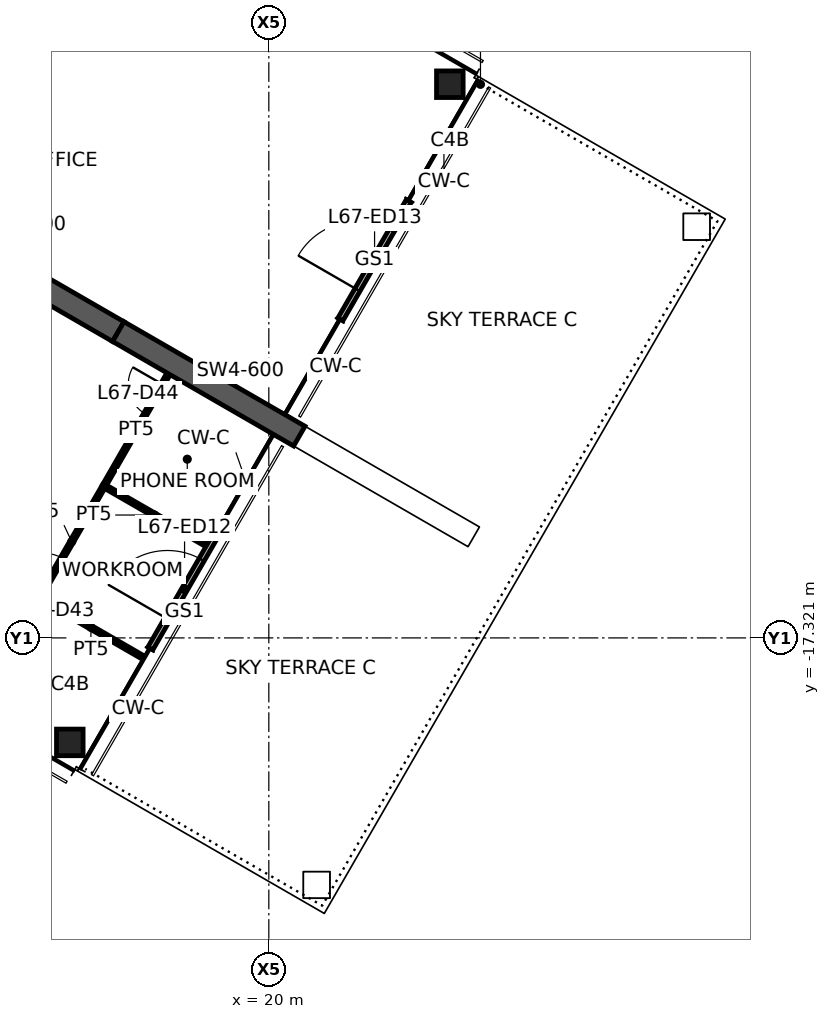
"""IFC4 building model, lengths in metres.
Left out: names, types, materials, properties, quantities, classifications, styles, units other than length and angle.
Written with IfcOpenShell. Run it as: python <this file> out.ifc"""

import sys

from ifc_helpers import new_model, si_unit, direction, frame, frame_2d, origin, origin_2d, place, context, subcontext, project, spatial, rectangle, hollow_rectangle, extrude, element, fill, save


model = new_model("IFC4")
c1 = context("Model", 3, precision=1e-05, world=origin(), true_north=direction((0.0, 1.0)))
c2 = subcontext(c1, "Body", "Model", "MODEL_VIEW")
j1 = project(units=[si_unit("LENGTHUNIT", "METRE"), si_unit("PLANEANGLEUNIT", "RADIAN")], contexts=[c1])
p1 = place(None, origin())
s1 = spatial("IfcSite", under=j1, at=p1, CompositionType="ELEMENT")
p2 = place(p1, origin())
s2 = spatial("IfcBuilding", under=s1, at=p2, CompositionType="ELEMENT")
p3 = place(p2, frame((0.0, 0.0, 267.4)))
s3 = spatial("IfcBuildingStorey", under=s2, at=p3, CompositionType="ELEMENT", Elevation=267.4)
for number, where, z_axis, x_axis in (
    (1, (14.763, -20.071, 0.0), (0.0, 0.0, 1.0), (1.0, 0.0, 0.0)),
    (2, (24.763, -2.75, 0.0), (0.0, 0.0, 1.0), (1.0, 0.0, 0.0)),
):
    element("IfcColumn", number, at=place(p3, frame(where, z_axis=z_axis, x_axis=x_axis)), inside=s3, PredefinedType="COLUMN", context=c2, shape_type="SweptSolid", body=[
        extrude(hollow_rectangle(XDim=0.7, YDim=0.7, WallThickness=0.032, at=origin_2d()), origin(), (0.0, 0.0, 1.0), 3.9),
    ])
p4 = place(p3, frame((9.288, -5.363, 0.0), z_axis=(0.0, 0.0, 1.0), x_axis=(0.866031736626, -0.499989031036, 0.0)))
e3 = element("IfcWall", 3, at=p4, inside=s3, PredefinedType="SHEAR", context=c2, shape_type="SweptSolid", body=[
    extrude(rectangle(XDim=7.796, YDim=0.6, at=frame_2d((3.898, 0.0))), origin(), (0.0, 0.0, 1.0), 3.9),
])
p5 = place(p4, frame((1.0, 0.0, 0.0)))
e4 = element("IfcOpeningElement", 4, at=p5, cuts=e3, PredefinedType="OPENING", context=c2, shape_type="SweptSolid", body=[
    extrude(rectangle(XDim=1.0, YDim=2.1, at=frame_2d((0.5, 1.05))), frame((0.0, 0.31, 0.0), z_axis=(0.0, -1.0, 0.0), x_axis=(1.0, 0.0, 0.0)), (0.0, 0.0, 1.0), 0.62),
])
p6 = place(p3, frame((16.039, -9.26, 0.0), z_axis=(0.0, 0.0, 1.0), x_axis=(0.866027397988, -0.499996545922, 0.0)))
e5 = element("IfcWall", 5, at=p6, inside=s3, PredefinedType="SHEAR", context=c2, shape_type="SweptSolid", body=[
    extrude(rectangle(XDim=5.5, YDim=0.6, at=frame_2d((2.75, 0.0))), origin(), (0.0, 0.0, 1.0), 3.9),
])
p7 = place(p3, frame((16.883, -17.599, 0.0), z_axis=(0.0, 0.0, 1.0), x_axis=(0.500012057535, 0.866018442252, 0.0)))
e6 = element("IfcWall", 6, at=p7, inside=s3, PredefinedType="STANDARD", context=c2, shape_type="SweptSolid", body=[
    extrude(rectangle(XDim=3.6, YDim=0.15, at=frame_2d((1.8, 0.0))), origin(), (0.0, 0.0, 1.0), 3.9),
])
p8 = place(p7, frame((0.9, 0.0, 0.0)))
e7 = element("IfcOpeningElement", 7, at=p8, cuts=e6, PredefinedType="OPENING", context=c2, shape_type="SweptSolid", body=[
    extrude(rectangle(XDim=1.8, YDim=2.1, at=frame_2d((0.9, 1.05))), frame((0.0, 0.085, 0.0), z_axis=(0.0, -1.0, 0.0), x_axis=(1.0, 0.0, 0.0)), (0.0, 0.0, 1.0), 0.17),
])
p9 = place(p3, frame((21.883, -8.939, 0.0), z_axis=(0.0, 0.0, 1.0), x_axis=(0.500012057535, 0.866018442252, 0.0)))
e8 = element("IfcWall", 8, at=p9, inside=s3, PredefinedType="STANDARD", context=c2, shape_type="SweptSolid", body=[
    extrude(rectangle(XDim=3.6, YDim=0.15, at=frame_2d((1.8, 0.0))), origin(), (0.0, 0.0, 1.0), 3.9),
])
p10 = place(p9, frame((0.9, 0.0, 0.0)))
e9 = element("IfcOpeningElement", 9, at=p10, cuts=e8, PredefinedType="OPENING", context=c2, shape_type="SweptSolid", body=[
    extrude(rectangle(XDim=1.8, YDim=2.1, at=frame_2d((0.9, 1.05))), frame((0.0, 0.085, 0.0), z_axis=(0.0, -1.0, 0.0), x_axis=(1.0, 0.0, 0.0)), (0.0, 0.0, 1.0), 0.17),
])
p11 = place(p3, frame((15.659, -13.319, 0.0), z_axis=(0.0, 0.0, 1.0), x_axis=(0.866844641549, -0.498578346319, 0.0)))
e10 = element("IfcWall", 10, at=p11, inside=s3, PredefinedType="PARTITIONING", context=c2, shape_type="SweptSolid", body=[
    extrude(rectangle(XDim=3.08, YDim=0.1, at=frame_2d((1.54, 0.0))), origin(), (0.0, 0.0, 1.0), 2.95),
])
p12 = place(p3, frame((13.961, -16.259, 0.0), z_axis=(0.0, 0.0, 1.0), x_axis=(0.501149490816, 0.865360727012, 0.0)))
e11 = element("IfcWall", 11, at=p12, inside=s3, PredefinedType="PARTITIONING", context=c2, shape_type="SweptSolid", body=[
    extrude(rectangle(XDim=3.4, YDim=0.1, at=frame_2d((1.7, 0.0))), origin(), (0.0, 0.0, 1.0), 2.95),
])
p13 = place(p12, frame((0.3, 0.0, 0.0)))
e12 = element("IfcOpeningElement", 12, at=p13, cuts=e11, PredefinedType="OPENING", context=c2, shape_type="SweptSolid", body=[
    extrude(rectangle(XDim=0.9, YDim=2.1, at=frame_2d((0.45, 1.05))), frame((0.0, 0.06, 0.0), z_axis=(0.0, -1.0, 0.0), x_axis=(1.0, 0.0, 0.0)), (0.0, 0.0, 1.0), 0.12),
])
p14 = place(p3, frame((16.676, -17.826, 0.0), z_axis=(0.0, 0.0, 1.0), x_axis=(-0.866038995786, 0.499976457224, 0.0)))
e13 = element("IfcWall", 13, at=p14, inside=s3, PredefinedType="PARTITIONING", context=c2, shape_type="SweptSolid", body=[
    extrude(rectangle(XDim=3.134, YDim=0.1, at=frame_2d((1.567, 0.0))), origin(), (0.0, 0.0, 1.0), 2.95),
])
p15 = place(p3, frame((15.665, -13.317, 0.0), z_axis=(0.0, 0.0, 1.0), x_axis=(0.498882251571, 0.866669775098, 0.0)))
e14 = element("IfcWall", 14, at=p15, inside=s3, PredefinedType="PARTITIONING", context=c2, shape_type="SweptSolid", body=[
    extrude(rectangle(XDim=3.38, YDim=0.1, at=frame_2d((1.69, 0.0))), origin(), (0.0, 0.0, 1.0), 2.95),
])
p16 = place(p15, frame((2.18, 0.0, 0.0)))
e15 = element("IfcOpeningElement", 15, at=p16, cuts=e14, PredefinedType="OPENING", context=c2, shape_type="SweptSolid", body=[
    extrude(rectangle(XDim=0.9, YDim=2.1, at=frame_2d((0.45, 1.05))), frame((0.0, 0.06, 0.0), z_axis=(0.0, -1.0, 0.0), x_axis=(1.0, 0.0, 0.0)), (0.0, 0.0, 1.0), 0.12),
])
p17 = place(p8, origin())
e16 = element("IfcDoor", 16, at=p17, inside=s3, OperationType="DOUBLE_DOOR_SINGLE_SWING", PredefinedType="DOOR", context=c2, shape_type="SweptSolid", body=[
    extrude(rectangle(XDim=1.8, YDim=2.1, at=frame_2d((0.9, 1.05))), frame((0.0, 0.025, 0.0), z_axis=(0.0, -1.0, 0.0), x_axis=(1.0, 0.0, 0.0)), (0.0, 0.0, 1.0), 0.05),
])
fill(e7, e16)
p18 = place(p10, origin())
e17 = element("IfcDoor", 17, at=p18, inside=s3, OperationType="DOUBLE_DOOR_SINGLE_SWING", PredefinedType="DOOR", context=c2, shape_type="SweptSolid", body=[
    extrude(rectangle(XDim=1.8, YDim=2.1, at=frame_2d((0.9, 1.05))), frame((0.0, 0.025, 0.0), z_axis=(0.0, -1.0, 0.0), x_axis=(1.0, 0.0, 0.0)), (0.0, 0.0, 1.0), 0.05),
])
fill(e9, e17)
p19 = place(p13, origin())
e18 = element("IfcDoor", 18, at=p19, inside=s3, OperationType="SINGLE_SWING_LEFT", PredefinedType="DOOR", context=c2, shape_type="SweptSolid", body=[
    extrude(rectangle(XDim=0.9, YDim=2.1, at=frame_2d((0.45, 1.05))), frame((0.0, 0.025, 0.0), z_axis=(0.0, -1.0, 0.0), x_axis=(1.0, 0.0, 0.0)), (0.0, 0.0, 1.0), 0.05),
])
fill(e12, e18)
p20 = place(p16, origin())
e19 = element("IfcDoor", 19, at=p20, inside=s3, OperationType="SINGLE_SWING_RIGHT", PredefinedType="DOOR", context=c2, shape_type="SweptSolid", body=[
    extrude(rectangle(XDim=0.9, YDim=2.1, at=frame_2d((0.45, 1.05))), frame((0.0, 0.025, 0.0), z_axis=(0.0, -1.0, 0.0), x_axis=(1.0, 0.0, 0.0)), (0.0, 0.0, 1.0), 0.05),
])
fill(e15, e19)
save(model, sys.argv[1])
